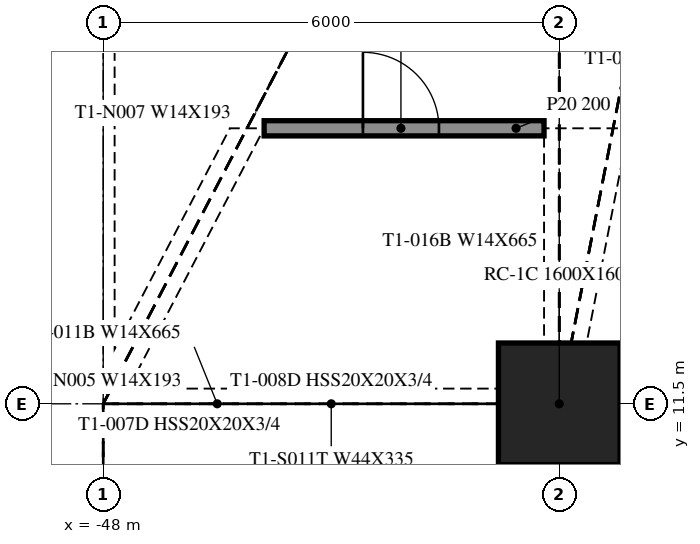
"""IFC4 building model, lengths in metres.
Left out: names, types, materials, properties, quantities, classifications, styles, units other than length and angle.
Written with IfcOpenShell. Run it as: python <this file> out.ifc"""

import sys

from ifc_helpers import new_model, si_unit, direction, frame, frame_2d, origin, origin_2d, place, context, subcontext, project, spatial, rectangle, extrude, element, fill, save


model = new_model("IFC4")
c1 = context("Model", 3, precision=1e-05, world=origin(), true_north=direction((0.0, 1.0)))
c2 = subcontext(c1, "Body", "Model", "MODEL_VIEW")
j1 = project(units=[si_unit("LENGTHUNIT", "METRE"), si_unit("PLANEANGLEUNIT", "RADIAN")], contexts=[c1])
p1 = place(None, origin())
s1 = spatial("IfcSite", under=j1, at=p1, CompositionType="ELEMENT")
p2 = place(p1, origin())
s2 = spatial("IfcBuilding", under=s1, at=p2, CompositionType="ELEMENT")
p3 = place(p2, frame((0.0, 0.0, 41.6)))
s3 = spatial("IfcBuildingStorey", under=s2, at=p3, CompositionType="ELEMENT", Elevation=41.6)
p4 = place(p3, frame((-42.0, 11.5, -0.55), z_axis=(0.0, 0.0, 1.0), x_axis=(1.0, 0.0, 0.0)))
e1 = element("IfcColumn", 1, at=p4, inside=s3, PredefinedType="COLUMN", context=c2, shape_type="SweptSolid", body=[
    extrude(rectangle(XDim=1.6, YDim=1.6, at=origin_2d()), origin(), (0.0, 0.0, 1.0), 4.61),
])
p5 = place(p3, frame((-45.883, 15.125, 0.0), z_axis=(0.0, 0.0, 1.0), x_axis=(1.0, 0.0, 0.0)))
e2 = element("IfcWall", 2, at=p5, inside=s3, PredefinedType="PARTITIONING", context=c2, shape_type="SweptSolid", body=[
    extrude(rectangle(XDim=3.683, YDim=0.2, at=frame_2d((1.841, 0.0))), origin(), (0.0, 0.0, 1.0), 4.06),
])
p6 = place(p5, frame((1.3, 0.0, 0.0)))
e3 = element("IfcOpeningElement", 3, at=p6, cuts=e2, PredefinedType="OPENING", context=c2, shape_type="SweptSolid", body=[
    extrude(rectangle(XDim=1.0, YDim=2.1, at=frame_2d((0.5, 1.05))), frame((0.0, 0.11, 0.0), z_axis=(0.0, -1.0, 0.0), x_axis=(1.0, 0.0, 0.0)), (0.0, 0.0, 1.0), 0.22),
])
p7 = place(p6, origin())
e4 = element("IfcDoor", 4, at=p7, inside=s3, OperationType="SINGLE_SWING_RIGHT", PredefinedType="DOOR", context=c2, shape_type="SweptSolid", body=[
    extrude(rectangle(XDim=1.0, YDim=2.1, at=frame_2d((0.5, 1.05))), frame((0.0, 0.025, 0.0), z_axis=(0.0, -1.0, 0.0), x_axis=(1.0, 0.0, 0.0)), (0.0, 0.0, 1.0), 0.05),
])
fill(e3, e4)
save(model, sys.argv[1])
